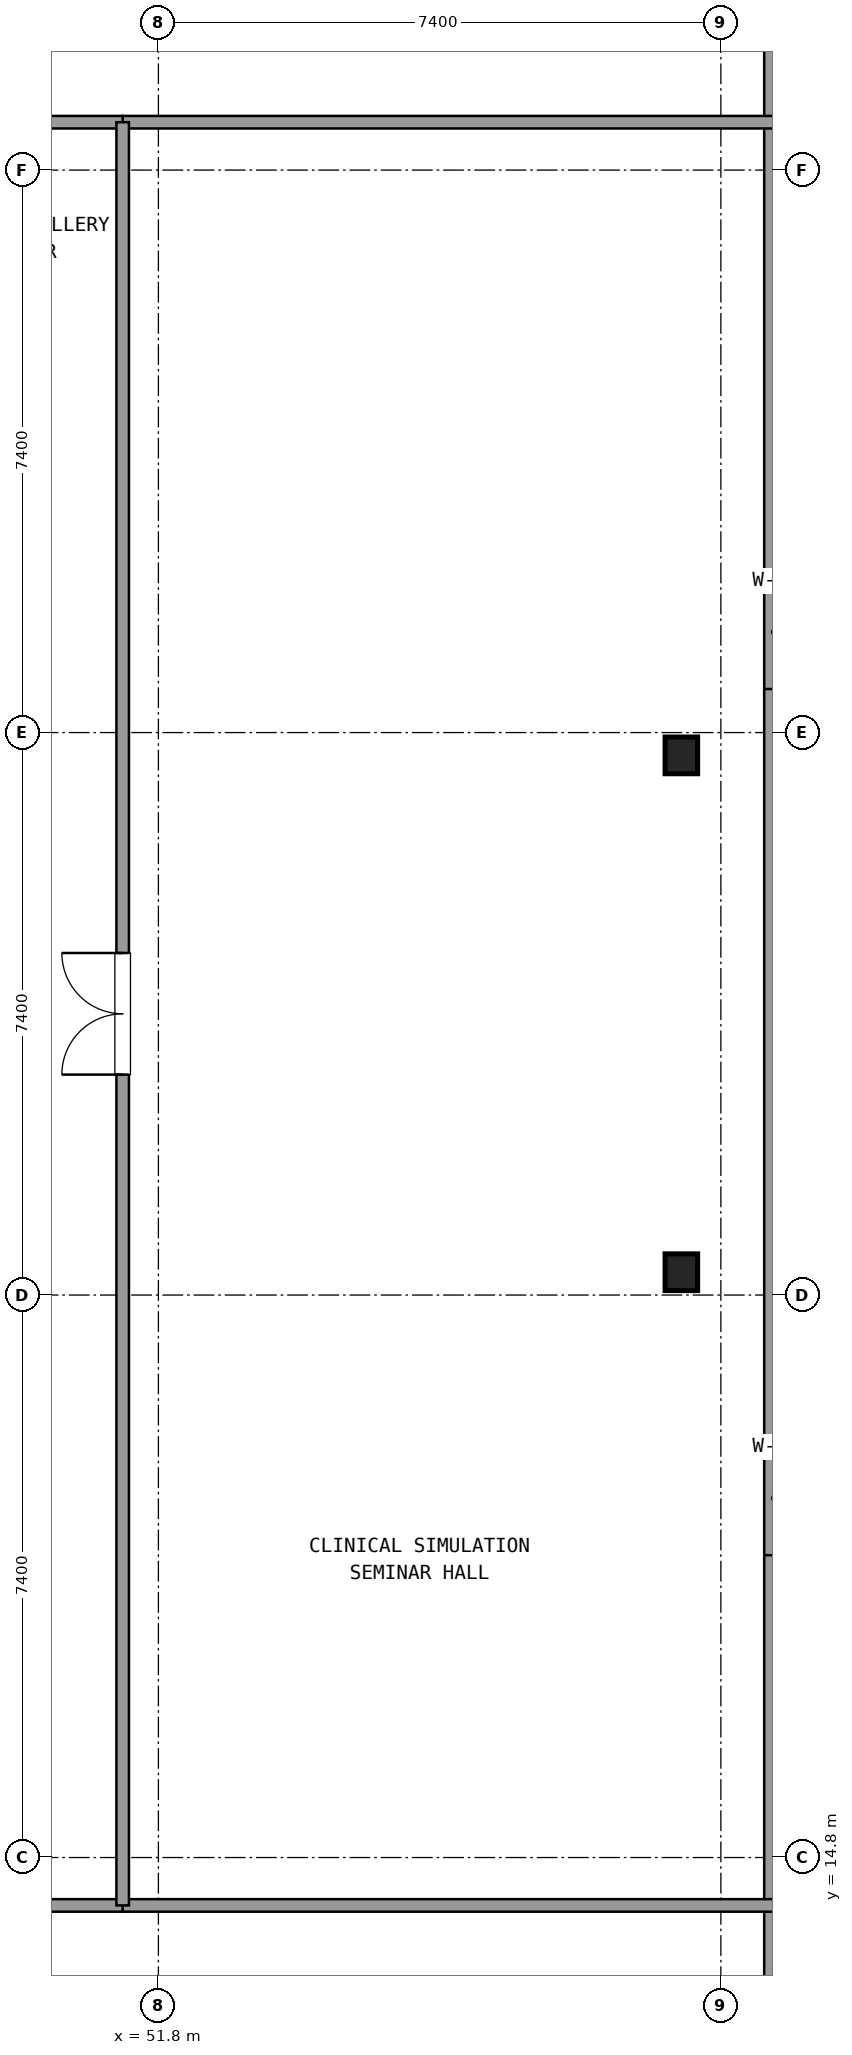
"""IFC4 building model, lengths in metres.
Left out: names, types, materials, properties, quantities, classifications, styles, units other than length and angle.
Written with IfcOpenShell. Run it as: python <this file> out.ifc"""

import sys

from ifc_helpers import new_model, si_unit, direction, frame, frame_2d, origin, origin_2d, place, context, subcontext, project, spatial, rectangle, i_section, extrude, element, fill, save


model = new_model("IFC4")
c1 = context("Model", 3, precision=1e-05, world=origin(), true_north=direction((0.0, 1.0)))
c2 = subcontext(c1, "Body", "Model", "MODEL_VIEW")
j1 = project(units=[si_unit("LENGTHUNIT", "METRE"), si_unit("PLANEANGLEUNIT", "RADIAN")], contexts=[c1])
p1 = place(None, origin())
s1 = spatial("IfcSite", under=j1, at=p1, CompositionType="ELEMENT")
p2 = place(p1, origin())
s2 = spatial("IfcBuilding", under=s1, at=p2, CompositionType="ELEMENT")
p3 = place(p2, frame((0.0, 0.0, 286.02)))
s3 = spatial("IfcBuildingStorey", under=s2, at=p3, CompositionType="ELEMENT", Elevation=286.02)
for number, where, z_axis, x_axis in (
    (1, (58.68, 22.5, 0.0), (0.0, 0.0, 1.0), (1.0, 0.0, 0.0)),
    (2, (58.68, 29.3, 0.0), (0.0, 0.0, 1.0), (1.0, 0.0, 0.0)),
):
    element("IfcColumn", number, at=place(p3, frame(where, z_axis=z_axis, x_axis=x_axis)), inside=s3, PredefinedType="COLUMN", context=c2, shape_type="SweptSolid", body=[
        extrude(i_section(OverallWidth=0.428, OverallDepth=0.483, WebThickness=0.042, FlangeThickness=0.068, at=origin_2d()), origin(), (0.0, 0.0, 1.0), 4.32),
    ])
p4 = place(p3, frame((59.92, 11.655, 0.0), z_axis=(0.0, 0.0, 1.0), x_axis=(0.0, 1.0, 0.0)))
e3 = element("IfcWall", 3, at=p4, inside=s3, PredefinedType="SOLIDWALL", context=c2, shape_type="SweptSolid", body=[
    extrude(rectangle(XDim=28.49, YDim=0.3, at=frame_2d((14.245, 0.0))), origin(), (0.0, 0.0, 1.0), 3.46),
])
p5 = place(p4, frame((7.122, 0.0, 0.85)))
e4 = element("IfcOpeningElement", 4, at=p5, cuts=e3, PredefinedType="OPENING", context=c2, shape_type="SweptSolid", body=[
    extrude(rectangle(XDim=1.5, YDim=1.65, at=frame_2d((0.75, 0.825))), frame((0.0, 0.16, 0.0), z_axis=(0.0, -1.0, 0.0), x_axis=(1.0, 0.0, 0.0)), (0.0, 0.0, 1.0), 0.32),
])
p6 = place(p4, frame((18.518, 0.0, 0.85)))
e5 = element("IfcOpeningElement", 5, at=p6, cuts=e3, PredefinedType="OPENING", context=c2, shape_type="SweptSolid", body=[
    extrude(rectangle(XDim=1.5, YDim=1.65, at=frame_2d((0.75, 0.825))), frame((0.0, 0.16, 0.0), z_axis=(0.0, -1.0, 0.0), x_axis=(1.0, 0.0, 0.0)), (0.0, 0.0, 1.0), 0.32),
])
for number, where, z_axis, x_axis in (
    (6, (51.33, 37.63, 0.0), (0.0, 0.0, 1.0), (1.0, 0.0, 0.0)),
    (7, (51.33, 14.17, 0.0), (0.0, 0.0, 1.0), (1.0, 0.0, 0.0)),
):
    element("IfcWall", number, at=place(p3, frame(where, z_axis=z_axis, x_axis=x_axis)), inside=s3, PredefinedType="PARTITIONING", context=c2, shape_type="SweptSolid", body=[
        extrude(rectangle(XDim=8.57, YDim=0.165, at=frame_2d((4.285, 0.0))), origin(), (0.0, 0.0, 1.0), 2.93),
    ])
p7 = place(p3, frame((42.32, 37.63, 0.0), z_axis=(0.0, 0.0, 1.0), x_axis=(1.0, 0.0, 0.0)))
e8 = element("IfcWall", 8, at=p7, inside=s3, PredefinedType="PARTITIONING", context=c2, shape_type="SweptSolid", body=[
    extrude(rectangle(XDim=9.01, YDim=0.165, at=frame_2d((4.505, 0.0))), origin(), (0.0, 0.0, 1.0), 2.93),
])
p8 = place(p7, frame((3.705, 0.0, 0.0)))
e9 = element("IfcOpeningElement", 9, at=p8, cuts=e8, PredefinedType="OPENING", context=c2, shape_type="SweptSolid", body=[
    extrude(rectangle(XDim=1.6, YDim=2.2, at=frame_2d((0.8, 1.1))), frame((0.0, 0.093, 0.0), z_axis=(0.0, -1.0, 0.0), x_axis=(1.0, 0.0, 0.0)), (0.0, 0.0, 1.0), 0.185),
])
p9 = place(p3, frame((46.678, 14.17, 0.0), z_axis=(0.0, 0.0, 1.0), x_axis=(1.0, 0.0, 0.0)))
e10 = element("IfcWall", 10, at=p9, inside=s3, PredefinedType="PARTITIONING", context=c2, shape_type="SweptSolid", body=[
    extrude(rectangle(XDim=4.652, YDim=0.165, at=frame_2d((2.326, 0.0))), origin(), (0.0, 0.0, 1.0), 2.93),
])
p10 = place(p9, frame((1.526, 0.0, 0.0)))
e11 = element("IfcOpeningElement", 11, at=p10, cuts=e10, PredefinedType="OPENING", context=c2, shape_type="SweptSolid", body=[
    extrude(rectangle(XDim=1.6, YDim=2.2, at=frame_2d((0.8, 1.1))), frame((0.0, 0.093, 0.0), z_axis=(0.0, -1.0, 0.0), x_axis=(1.0, 0.0, 0.0)), (0.0, 0.0, 1.0), 0.185),
])
p11 = place(p3, frame((51.33, 14.17, 0.0), z_axis=(0.0, 0.0, 1.0), x_axis=(0.0, 1.0, 0.0)))
e12 = element("IfcWall", 12, at=p11, inside=s3, PredefinedType="PARTITIONING", context=c2, shape_type="SweptSolid", body=[
    extrude(rectangle(XDim=23.46, YDim=0.165, at=frame_2d((11.73, 0.0))), origin(), (0.0, 0.0, 1.0), 2.93),
])
p12 = place(p11, frame((10.93, 0.0, 0.0)))
e13 = element("IfcOpeningElement", 13, at=p12, cuts=e12, PredefinedType="OPENING", context=c2, shape_type="SweptSolid", body=[
    extrude(rectangle(XDim=1.6, YDim=2.2, at=frame_2d((0.8, 1.1))), frame((0.0, 0.093, 0.0), z_axis=(0.0, -1.0, 0.0), x_axis=(1.0, 0.0, 0.0)), (0.0, 0.0, 1.0), 0.185),
])
p13 = place(p12, origin())
e14 = element("IfcDoor", 14, at=p13, inside=s3, OperationType="DOUBLE_DOOR_SINGLE_SWING", PredefinedType="DOOR", context=c2, shape_type="SweptSolid", body=[
    extrude(rectangle(XDim=1.6, YDim=2.2, at=frame_2d((0.8, 1.1))), frame((0.0, 0.025, 0.0), z_axis=(0.0, -1.0, 0.0), x_axis=(1.0, 0.0, 0.0)), (0.0, 0.0, 1.0), 0.05),
])
fill(e13, e14)
save(model, sys.argv[1])
